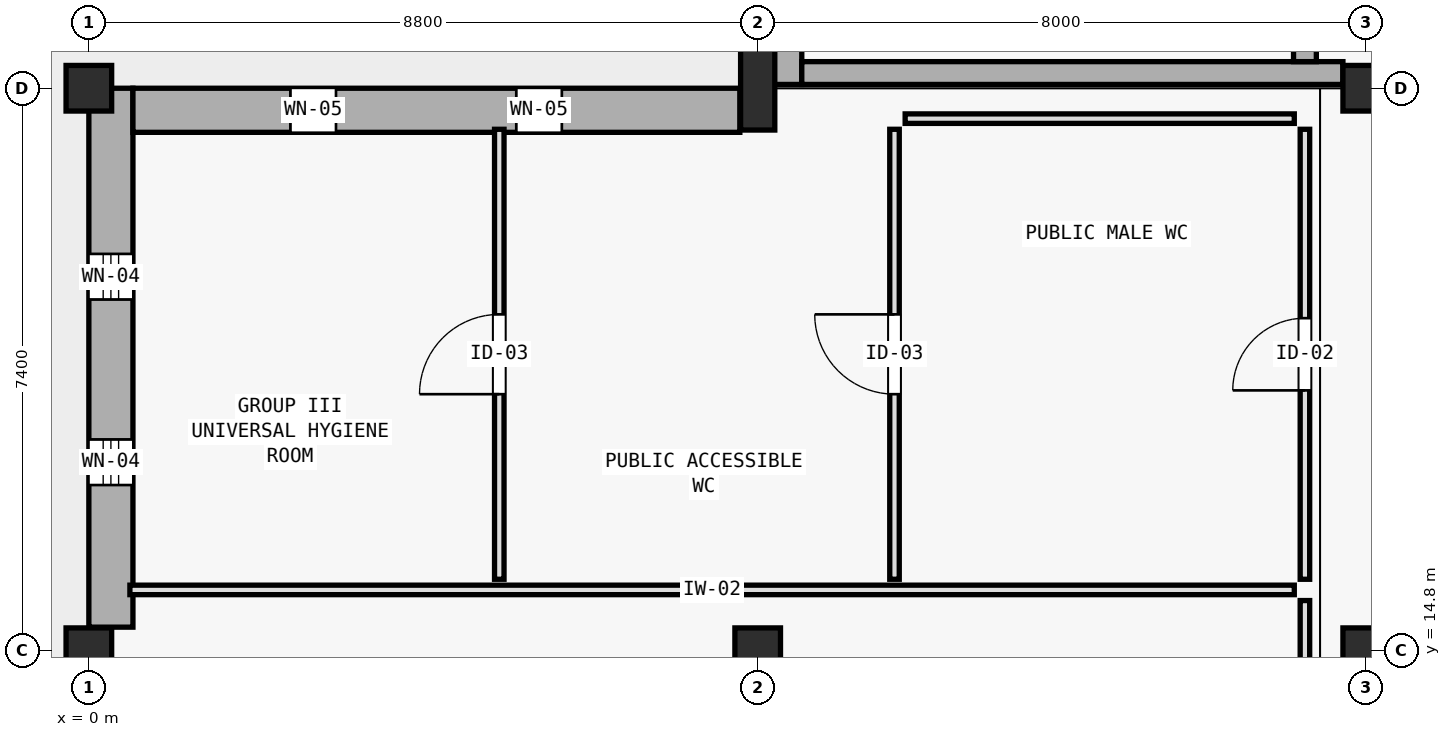
"""IFC4 building model, lengths in metres.
Left out: names, types, materials, properties, quantities, classifications, styles, units other than length and angle.
Written with IfcOpenShell. Run it as: python <this file> out.ifc"""

import sys

from ifc_helpers import new_model, si_unit, direction, frame, frame_2d, origin, origin_2d, place, context, subcontext, project, spatial, rectangle, extrude, element, fill, save


model = new_model("IFC4")
c1 = context("Model", 3, precision=1e-05, world=origin(), true_north=direction((0.0, 1.0)))
c2 = subcontext(c1, "Body", "Model", "MODEL_VIEW")
j1 = project(units=[si_unit("LENGTHUNIT", "METRE"), si_unit("PLANEANGLEUNIT", "RADIAN")], contexts=[c1])
p1 = place(None, origin())
s1 = spatial("IfcSite", under=j1, at=p1, CompositionType="ELEMENT")
p2 = place(p1, origin())
s2 = spatial("IfcBuilding", under=s1, at=p2, CompositionType="ELEMENT")
p3 = place(p2, origin())
s3 = spatial("IfcBuildingStorey", under=s2, at=p3, CompositionType="ELEMENT", Elevation=0.0)
for number, where, z_axis, x_axis in (
    (1, (0.0, 14.8, 0.0), (0.0, 0.0, 1.0), (1.0, 0.0, 0.0)),
    (2, (0.0, 22.2, 0.0), (0.0, 0.0, 1.0), (1.0, 0.0, 0.0)),
    (3, (8.8, 14.8, 0.0), (0.0, 0.0, 1.0), (1.0, 0.0, 0.0)),
):
    element("IfcColumn", number, at=place(p3, frame(where, z_axis=z_axis, x_axis=x_axis)), inside=s3, PredefinedType="COLUMN", context=c2, shape_type="SweptSolid", body=[
        extrude(rectangle(XDim=0.6, YDim=0.6, at=origin_2d()), origin(), (0.0, 0.0, 1.0), 5.4),
    ])
p4 = place(p3, frame((8.8, 22.2, 0.0), z_axis=(0.0, 0.0, 1.0), x_axis=(1.0, 0.0, 0.0)))
e4 = element("IfcColumn", 4, at=p4, inside=s3, PredefinedType="PILASTER", context=c2, shape_type="SweptSolid", body=[
    extrude(rectangle(XDim=0.45, YDim=1.1, at=origin_2d()), origin(), (0.0, 0.0, 1.0), 5.4),
])
for number, where, z_axis, x_axis in (
    (5, (16.8, 14.8, 0.0), (0.0, 0.0, 1.0), (1.0, 0.0, 0.0)),
    (6, (16.8, 22.2, 0.0), (0.0, 0.0, 1.0), (1.0, 0.0, 0.0)),
):
    element("IfcColumn", number, at=place(p3, frame(where, z_axis=z_axis, x_axis=x_axis)), inside=s3, PredefinedType="COLUMN", context=c2, shape_type="SweptSolid", body=[
        extrude(rectangle(XDim=0.6, YDim=0.6, at=origin_2d()), origin(), (0.0, 0.0, 1.0), 5.4),
    ])
p5 = place(p3, frame((0.29, 15.11, 0.0), z_axis=(0.0, 0.0, 1.0), x_axis=(0.0, 1.0, 0.0)))
e7 = element("IfcWall", 7, at=p5, inside=s3, PredefinedType="STANDARD", context=c2, shape_type="SweptSolid", body=[
    extrude(rectangle(XDim=7.09, YDim=0.58, at=frame_2d((3.545, 0.0))), origin(), (0.0, 0.0, 1.0), 5.14),
])
p6 = place(p5, frame((1.87, 0.0, 0.9)))
e8 = element("IfcOpeningElement", 8, at=p6, cuts=e7, PredefinedType="OPENING", context=c2, shape_type="SweptSolid", body=[
    extrude(rectangle(XDim=0.6, YDim=1.85, at=frame_2d((0.3, 0.925))), frame((0.0, 0.3, 0.0), z_axis=(0.0, -1.0, 0.0), x_axis=(1.0, 0.0, 0.0)), (0.0, 0.0, 1.0), 0.6),
])
p7 = place(p5, frame((4.31, 0.0, 0.9)))
e9 = element("IfcOpeningElement", 9, at=p7, cuts=e7, PredefinedType="OPENING", context=c2, shape_type="SweptSolid", body=[
    extrude(rectangle(XDim=0.6, YDim=1.85, at=frame_2d((0.3, 0.925))), frame((0.0, 0.3, 0.0), z_axis=(0.0, -1.0, 0.0), x_axis=(1.0, 0.0, 0.0)), (0.0, 0.0, 1.0), 0.6),
])
p8 = place(p3, frame((0.58, 21.91, 0.0), z_axis=(0.0, 0.0, 1.0), x_axis=(1.0, 0.0, 0.0)))
e10 = element("IfcWall", 10, at=p8, inside=s3, PredefinedType="STANDARD", context=c2, shape_type="SweptSolid", body=[
    extrude(rectangle(XDim=7.985, YDim=0.58, at=frame_2d((3.992, 0.0))), origin(), (0.0, 0.0, 1.0), 5.14),
])
p9 = place(p8, frame((2.072, 0.0, 0.9)))
e11 = element("IfcOpeningElement", 11, at=p9, cuts=e10, PredefinedType="OPENING", context=c2, shape_type="SweptSolid", body=[
    extrude(rectangle(XDim=0.6, YDim=2.2, at=frame_2d((0.3, 1.1))), frame((0.0, 0.3, 0.0), z_axis=(0.0, -1.0, 0.0), x_axis=(1.0, 0.0, 0.0)), (0.0, 0.0, 1.0), 0.6),
])
p10 = place(p8, frame((5.043, 0.0, 0.9)))
e12 = element("IfcOpeningElement", 12, at=p10, cuts=e10, PredefinedType="OPENING", context=c2, shape_type="SweptSolid", body=[
    extrude(rectangle(XDim=0.6, YDim=2.2, at=frame_2d((0.3, 1.1))), frame((0.0, 0.3, 0.0), z_axis=(0.0, -1.0, 0.0), x_axis=(1.0, 0.0, 0.0)), (0.0, 0.0, 1.0), 0.6),
])
p11 = place(p3, frame((9.09, 22.25, 0.0), z_axis=(0.0, 0.0, 1.0), x_axis=(0.0, 1.0, 0.0)))
e13 = element("IfcWall", 13, at=p11, inside=s3, PredefinedType="STANDARD", context=c2, shape_type="SweptSolid", body=[
    extrude(rectangle(XDim=7.04, YDim=0.58, at=frame_2d((3.52, 0.0))), origin(), (0.0, 0.0, 1.0), 5.14),
])
p12 = place(p11, frame((2.3, 0.0, 0.9)))
e14 = element("IfcOpeningElement", 14, at=p12, cuts=e13, PredefinedType="OPENING", context=c2, shape_type="SweptSolid", body=[
    extrude(rectangle(XDim=0.6, YDim=2.6, at=frame_2d((0.3, 1.3))), frame((0.0, 0.3, 0.0), z_axis=(0.0, -1.0, 0.0), x_axis=(1.0, 0.0, 0.0)), (0.0, 0.0, 1.0), 0.6),
])
p13 = place(p11, frame((4.65, 0.0, 0.9)))
e15 = element("IfcOpeningElement", 15, at=p13, cuts=e13, PredefinedType="OPENING", context=c2, shape_type="SweptSolid", body=[
    extrude(rectangle(XDim=0.6, YDim=2.6, at=frame_2d((0.3, 1.3))), frame((0.0, 0.3, 0.0), z_axis=(0.0, -1.0, 0.0), x_axis=(1.0, 0.0, 0.0)), (0.0, 0.0, 1.0), 0.6),
])
p14 = place(p3, frame((0.54, 15.6, 0.0), z_axis=(0.0, 0.0, 1.0), x_axis=(1.0, 0.0, 0.0)))
e16 = element("IfcWall", 16, at=p14, inside=s3, PredefinedType="PARTITIONING", context=c2, shape_type="SweptSolid", body=[
    extrude(rectangle(XDim=15.32, YDim=0.125, at=frame_2d((7.66, 0.0))), origin(), (0.0, 0.0, 1.0), 4.27),
])
p15 = place(p3, frame((16.0, 0.54, 0.0), z_axis=(0.0, 0.0, 1.0), x_axis=(0.0, 1.0, 0.0)))
e17 = element("IfcWall", 17, at=p15, inside=s3, PredefinedType="PARTITIONING", context=c2, shape_type="SweptSolid", body=[
    extrude(rectangle(XDim=14.92, YDim=0.125, at=frame_2d((7.46, 0.0))), origin(), (0.0, 0.0, 1.0), 4.27),
])
p16 = place(p15, frame((8.998, 0.0, 0.0)))
e18 = element("IfcOpeningElement", 18, at=p16, cuts=e17, PredefinedType="OPENING", context=c2, shape_type="SweptSolid", body=[
    extrude(rectangle(XDim=1.4, YDim=2.2, at=frame_2d((0.7, 1.1))), frame((0.0, 0.073, 0.0), z_axis=(0.0, -1.0, 0.0), x_axis=(1.0, 0.0, 0.0)), (0.0, 0.0, 1.0), 0.145),
])
p17 = place(p3, frame((5.4, 15.74, 0.0), z_axis=(0.0, 0.0, 1.0), x_axis=(0.0, 1.0, 0.0)))
e19 = element("IfcWall", 19, at=p17, inside=s3, PredefinedType="PARTITIONING", context=c2, shape_type="SweptSolid", body=[
    extrude(rectangle(XDim=5.92, YDim=0.125, at=frame_2d((2.96, 0.0))), origin(), (0.0, 0.0, 1.0), 5.14),
])
p18 = place(p17, frame((2.435, 0.0, 0.0)))
e20 = element("IfcOpeningElement", 20, at=p18, cuts=e19, PredefinedType="OPENING", context=c2, shape_type="SweptSolid", body=[
    extrude(rectangle(XDim=1.05, YDim=2.1, at=frame_2d((0.525, 1.05))), frame((0.0, 0.073, 0.0), z_axis=(0.0, -1.0, 0.0), x_axis=(1.0, 0.0, 0.0)), (0.0, 0.0, 1.0), 0.145),
])
p19 = place(p3, frame((10.6, 15.74, 0.0), z_axis=(0.0, 0.0, 1.0), x_axis=(0.0, 1.0, 0.0)))
e21 = element("IfcWall", 21, at=p19, inside=s3, PredefinedType="PARTITIONING", context=c2, shape_type="SweptSolid", body=[
    extrude(rectangle(XDim=5.92, YDim=0.125, at=frame_2d((2.96, 0.0))), origin(), (0.0, 0.0, 1.0), 5.14),
])
p20 = place(p19, frame((2.435, 0.0, 0.0)))
e22 = element("IfcOpeningElement", 22, at=p20, cuts=e21, PredefinedType="OPENING", context=c2, shape_type="SweptSolid", body=[
    extrude(rectangle(XDim=1.05, YDim=2.1, at=frame_2d((0.525, 1.05))), frame((0.0, 0.073, 0.0), z_axis=(0.0, -1.0, 0.0), x_axis=(1.0, 0.0, 0.0)), (0.0, 0.0, 1.0), 0.145),
])
p21 = place(p3, frame((10.74, 21.8, 0.0), z_axis=(0.0, 0.0, 1.0), x_axis=(1.0, 0.0, 0.0)))
e23 = element("IfcWall", 23, at=p21, inside=s3, PredefinedType="PARTITIONING", context=c2, shape_type="SweptSolid", body=[
    extrude(rectangle(XDim=5.12, YDim=0.125, at=frame_2d((2.56, 0.0))), origin(), (0.0, 0.0, 1.0), 4.76),
])
p22 = place(p3, frame((16.0, 15.74, 0.0), z_axis=(0.0, 0.0, 1.0), x_axis=(0.0, 1.0, 0.0)))
e24 = element("IfcWall", 24, at=p22, inside=s3, PredefinedType="PARTITIONING", context=c2, shape_type="SweptSolid", body=[
    extrude(rectangle(XDim=5.92, YDim=0.125, at=frame_2d((2.96, 0.0))), origin(), (0.0, 0.0, 1.0), 5.14),
])
p23 = place(p22, frame((2.485, 0.0, 0.0)))
e25 = element("IfcOpeningElement", 25, at=p23, cuts=e24, PredefinedType="OPENING", context=c2, shape_type="SweptSolid", body=[
    extrude(rectangle(XDim=0.95, YDim=2.1, at=frame_2d((0.475, 1.05))), frame((0.0, 0.073, 0.0), z_axis=(0.0, -1.0, 0.0), x_axis=(1.0, 0.0, 0.0)), (0.0, 0.0, 1.0), 0.145),
])
p24 = place(p3, frame((9.38, 22.4, 0.0), z_axis=(0.0, 0.0, 1.0), x_axis=(1.0, 0.0, 0.0)))
e26 = element("IfcWall", 26, at=p24, inside=s3, PredefinedType="SHEAR", context=c2, shape_type="SweptSolid", body=[
    extrude(rectangle(XDim=7.12, YDim=0.3, at=frame_2d((3.56, 0.0))), origin(), (0.0, 0.0, 1.0), 4.27),
])
p25 = place(p3, frame((16.0, 22.55, 0.0), z_axis=(0.0, 0.0, 1.0), x_axis=(0.0, 1.0, 0.0)))
e27 = element("IfcWall", 27, at=p25, inside=s3, PredefinedType="SHEAR", context=c2, shape_type="SweptSolid", body=[
    extrude(rectangle(XDim=14.3, YDim=0.3, at=frame_2d((7.15, 0.0))), origin(), (0.0, 0.0, 1.0), 4.27),
])
p26 = place(p25, frame((4.352, 0.0, 0.0)))
e28 = element("IfcOpeningElement", 28, at=p26, cuts=e27, PredefinedType="OPENING", context=c2, shape_type="SweptSolid", body=[
    extrude(rectangle(XDim=1.3, YDim=2.2, at=frame_2d((0.65, 1.1))), frame((0.0, 0.16, 0.0), z_axis=(0.0, -1.0, 0.0), x_axis=(1.0, 0.0, 0.0)), (0.0, 0.0, 1.0), 0.32),
])
p27 = place(p6, origin())
e29 = element("IfcWindow", 29, at=p27, inside=s3, PartitioningType="SINGLE_PANEL", PredefinedType="WINDOW", context=c2, shape_type="SweptSolid", body=[
    extrude(rectangle(XDim=0.6, YDim=1.85, at=frame_2d((0.3, 0.925))), frame((0.0, 0.03, 0.0), z_axis=(0.0, -1.0, 0.0), x_axis=(1.0, 0.0, 0.0)), (0.0, 0.0, 1.0), 0.06),
])
fill(e8, e29)
p28 = place(p7, origin())
e30 = element("IfcWindow", 30, at=p28, inside=s3, PartitioningType="SINGLE_PANEL", PredefinedType="WINDOW", context=c2, shape_type="SweptSolid", body=[
    extrude(rectangle(XDim=0.6, YDim=1.85, at=frame_2d((0.3, 0.925))), frame((0.0, 0.03, 0.0), z_axis=(0.0, -1.0, 0.0), x_axis=(1.0, 0.0, 0.0)), (0.0, 0.0, 1.0), 0.06),
])
fill(e9, e30)
p29 = place(p9, origin())
e31 = element("IfcWindow", 31, at=p29, inside=s3, PartitioningType="SINGLE_PANEL", PredefinedType="WINDOW", context=c2, shape_type="SweptSolid", body=[
    extrude(rectangle(XDim=0.6, YDim=2.2, at=frame_2d((0.3, 1.1))), frame((0.0, 0.03, 0.0), z_axis=(0.0, -1.0, 0.0), x_axis=(1.0, 0.0, 0.0)), (0.0, 0.0, 1.0), 0.06),
])
fill(e11, e31)
p30 = place(p10, origin())
e32 = element("IfcWindow", 32, at=p30, inside=s3, PartitioningType="SINGLE_PANEL", PredefinedType="WINDOW", context=c2, shape_type="SweptSolid", body=[
    extrude(rectangle(XDim=0.6, YDim=2.2, at=frame_2d((0.3, 1.1))), frame((0.0, 0.03, 0.0), z_axis=(0.0, -1.0, 0.0), x_axis=(1.0, 0.0, 0.0)), (0.0, 0.0, 1.0), 0.06),
])
fill(e12, e32)
p31 = place(p18, origin())
e33 = element("IfcDoor", 33, at=p31, inside=s3, OperationType="SINGLE_SWING_LEFT", PredefinedType="DOOR", context=c2, shape_type="SweptSolid", body=[
    extrude(rectangle(XDim=1.05, YDim=2.1, at=frame_2d((0.525, 1.05))), frame((0.0, 0.025, 0.0), z_axis=(0.0, -1.0, 0.0), x_axis=(1.0, 0.0, 0.0)), (0.0, 0.0, 1.0), 0.05),
])
fill(e20, e33)
p32 = place(p20, origin())
e34 = element("IfcDoor", 34, at=p32, inside=s3, OperationType="SINGLE_SWING_RIGHT", PredefinedType="DOOR", context=c2, shape_type="SweptSolid", body=[
    extrude(rectangle(XDim=1.05, YDim=2.1, at=frame_2d((0.525, 1.05))), frame((0.0, 0.025, 0.0), z_axis=(0.0, -1.0, 0.0), x_axis=(1.0, 0.0, 0.0)), (0.0, 0.0, 1.0), 0.05),
])
fill(e22, e34)
p33 = place(p23, origin())
e35 = element("IfcDoor", 35, at=p33, inside=s3, OperationType="SINGLE_SWING_LEFT", PredefinedType="DOOR", context=c2, shape_type="SweptSolid", body=[
    extrude(rectangle(XDim=0.95, YDim=2.1, at=frame_2d((0.475, 1.05))), frame((0.0, 0.025, 0.0), z_axis=(0.0, -1.0, 0.0), x_axis=(1.0, 0.0, 0.0)), (0.0, 0.0, 1.0), 0.05),
])
fill(e25, e35)
save(model, sys.argv[1])
